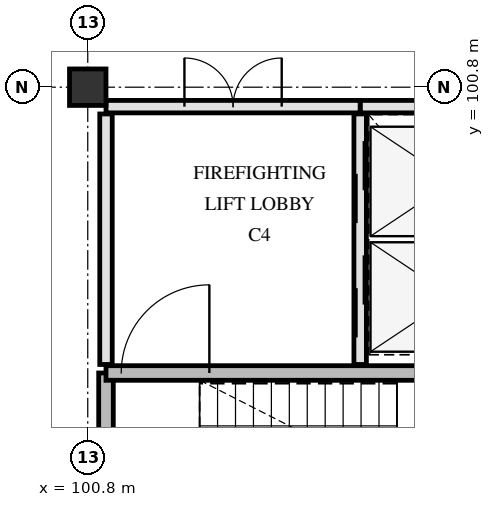
"""IFC4 building model, lengths in metres.
Left out: names, types, materials, properties, quantities, classifications, styles, units other than length and angle.
Written with IfcOpenShell. Run it as: python <this file> out.ifc"""

import sys

from ifc_helpers import new_model, si_unit, direction, frame, frame_2d, origin, origin_2d, place, context, subcontext, project, spatial, rectangle, extrude, element, fill, save


model = new_model("IFC4")
c1 = context("Model", 3, precision=1e-05, world=origin(), true_north=direction((0.0, 1.0)))
c2 = subcontext(c1, "Body", "Model", "MODEL_VIEW")
j1 = project(units=[si_unit("LENGTHUNIT", "METRE"), si_unit("PLANEANGLEUNIT", "RADIAN")], contexts=[c1])
p1 = place(None, origin())
s1 = spatial("IfcSite", under=j1, at=p1, CompositionType="ELEMENT")
p2 = place(p1, origin())
s2 = spatial("IfcBuilding", under=s1, at=p2, CompositionType="ELEMENT")
p3 = place(p2, frame((0.0, 0.0, 22.5)))
s3 = spatial("IfcBuildingStorey", under=s2, at=p3, CompositionType="ELEMENT", Elevation=22.5)
p4 = place(p3, frame((100.8, 100.8, 0.0), z_axis=(0.0, 0.0, 1.0), x_axis=(1.0, 0.0, 0.0)))
e1 = element("IfcColumn", 1, at=p4, inside=s3, PredefinedType="COLUMN", context=c2, shape_type="SweptSolid", body=[
    extrude(rectangle(XDim=0.6, YDim=0.6, at=origin_2d()), origin(), (0.0, 0.0, 1.0), 3.9),
])
p5 = place(p3, frame((101.1, 92.78, 0.0), z_axis=(0.0, 0.0, 1.0), x_axis=(0.0, 1.0, 0.0)))
e2 = element("IfcWall", 2, at=p5, inside=s3, PredefinedType="SHEAR", context=c2, shape_type="SweptSolid", body=[
    extrude(rectangle(XDim=3.32, YDim=0.24, at=frame_2d((1.66, 0.0))), origin(), (0.0, 0.0, 1.0), 3.62),
])
p6 = place(p3, frame((101.1, 96.1, 0.0), z_axis=(0.0, 0.0, 1.0), x_axis=(1.0, 0.0, 0.0)))
e3 = element("IfcWall", 3, at=p6, inside=s3, PredefinedType="SHEAR", context=c2, shape_type="SweptSolid", body=[
    extrude(rectangle(XDim=7.82, YDim=0.24, at=frame_2d((3.91, 0.0))), origin(), (0.0, 0.0, 1.0), 3.62),
])
p7 = place(p6, frame((0.25, 0.0, 0.0)))
e4 = element("IfcOpeningElement", 4, at=p7, cuts=e3, PredefinedType="OPENING", context=c2, shape_type="SweptSolid", body=[
    extrude(rectangle(XDim=1.45, YDim=2.2, at=frame_2d((0.725, 1.1))), frame((0.0, 0.13, 0.0), z_axis=(0.0, -1.0, 0.0), x_axis=(1.0, 0.0, 0.0)), (0.0, 0.0, 1.0), 0.26),
])
p8 = place(p3, frame((105.28, 96.24, 0.0), z_axis=(0.0, 0.0, 1.0), x_axis=(0.0, 1.0, 0.0)))
e5 = element("IfcWall", 5, at=p8, inside=s3, PredefinedType="PARTITIONING", context=c2, shape_type="SweptSolid", body=[
    extrude(rectangle(XDim=4.12, YDim=0.205, at=frame_2d((2.06, 0.0))), origin(), (0.0, 0.0, 1.0), 3.61),
])
p9 = place(p8, frame((0.445, 0.0, 0.0)))
e6 = element("IfcOpeningElement", 6, at=p9, cuts=e5, PredefinedType="OPENING", context=c2, shape_type="SweptSolid", body=[
    extrude(rectangle(XDim=1.35, YDim=2.2, at=frame_2d((0.675, 1.1))), frame((0.0, 0.113, 0.0), z_axis=(0.0, -1.0, 0.0), x_axis=(1.0, 0.0, 0.0)), (0.0, 0.0, 1.0), 0.225),
])
p10 = place(p8, frame((2.325, 0.0, 0.0)))
e7 = element("IfcOpeningElement", 7, at=p10, cuts=e5, PredefinedType="OPENING", context=c2, shape_type="SweptSolid", body=[
    extrude(rectangle(XDim=1.35, YDim=2.2, at=frame_2d((0.675, 1.1))), frame((0.0, 0.113, 0.0), z_axis=(0.0, -1.0, 0.0), x_axis=(1.0, 0.0, 0.0)), (0.0, 0.0, 1.0), 0.225),
])
p11 = place(p3, frame((105.28, 100.48, 0.0), z_axis=(0.0, 0.0, 1.0), x_axis=(1.0, 0.0, 0.0)))
e8 = element("IfcWall", 8, at=p11, inside=s3, PredefinedType="PARTITIONING", context=c2, shape_type="SweptSolid", body=[
    extrude(rectangle(XDim=3.57, YDim=0.205, at=frame_2d((1.785, 0.0))), origin(), (0.0, 0.0, 1.0), 3.61),
])
p12 = place(p3, frame((101.1, 96.24, 0.0), z_axis=(0.0, 0.0, 1.0), x_axis=(0.0, 1.0, 0.0)))
e9 = element("IfcWall", 9, at=p12, inside=s3, PredefinedType="PARTITIONING", context=c2, shape_type="SweptSolid", body=[
    extrude(rectangle(XDim=4.12, YDim=0.205, at=frame_2d((2.06, 0.0))), origin(), (0.0, 0.0, 1.0), 3.61),
])
p13 = place(p3, frame((101.1, 100.48, 0.0), z_axis=(0.0, 0.0, 1.0), x_axis=(1.0, 0.0, 0.0)))
e10 = element("IfcWall", 10, at=p13, inside=s3, PredefinedType="PARTITIONING", context=c2, shape_type="SweptSolid", body=[
    extrude(rectangle(XDim=4.18, YDim=0.205, at=frame_2d((2.09, 0.0))), origin(), (0.0, 0.0, 1.0), 3.61),
])
p14 = place(p13, frame((1.29, 0.0, 0.0)))
e11 = element("IfcOpeningElement", 11, at=p14, cuts=e10, PredefinedType="OPENING", context=c2, shape_type="SweptSolid", body=[
    extrude(rectangle(XDim=1.6, YDim=2.25, at=frame_2d((0.8, 1.125))), frame((0.0, 0.113, 0.0), z_axis=(0.0, -1.0, 0.0), x_axis=(1.0, 0.0, 0.0)), (0.0, 0.0, 1.0), 0.225),
])
p15 = place(p7, origin())
e12 = element("IfcDoor", 12, at=p15, inside=s3, OperationType="SINGLE_SWING_RIGHT", PredefinedType="DOOR", context=c2, shape_type="SweptSolid", body=[
    extrude(rectangle(XDim=1.45, YDim=2.2, at=frame_2d((0.725, 1.1))), frame((0.0, 0.025, 0.0), z_axis=(0.0, -1.0, 0.0), x_axis=(1.0, 0.0, 0.0)), (0.0, 0.0, 1.0), 0.05),
])
fill(e4, e12)
p16 = place(p9, origin())
e13 = element("IfcDoor", 13, at=p16, inside=s3, OperationType="SLIDING_TO_LEFT", PredefinedType="DOOR", context=c2, shape_type="SweptSolid", body=[
    extrude(rectangle(XDim=1.35, YDim=2.2, at=frame_2d((0.675, 1.1))), frame((0.0, 0.025, 0.0), z_axis=(0.0, -1.0, 0.0), x_axis=(1.0, 0.0, 0.0)), (0.0, 0.0, 1.0), 0.05),
])
fill(e6, e13)
p17 = place(p10, origin())
e14 = element("IfcDoor", 14, at=p17, inside=s3, OperationType="SLIDING_TO_LEFT", PredefinedType="DOOR", context=c2, shape_type="SweptSolid", body=[
    extrude(rectangle(XDim=1.35, YDim=2.2, at=frame_2d((0.675, 1.1))), frame((0.0, 0.025, 0.0), z_axis=(0.0, -1.0, 0.0), x_axis=(1.0, 0.0, 0.0)), (0.0, 0.0, 1.0), 0.05),
])
fill(e7, e14)
p18 = place(p14, origin())
e15 = element("IfcDoor", 15, at=p18, inside=s3, OperationType="DOUBLE_SWING_LEFT", PredefinedType="DOOR", context=c2, shape_type="SweptSolid", body=[
    extrude(rectangle(XDim=1.6, YDim=2.25, at=frame_2d((0.8, 1.125))), frame((0.0, 0.025, 0.0), z_axis=(0.0, -1.0, 0.0), x_axis=(1.0, 0.0, 0.0)), (0.0, 0.0, 1.0), 0.05),
])
fill(e11, e15)
save(model, sys.argv[1])
